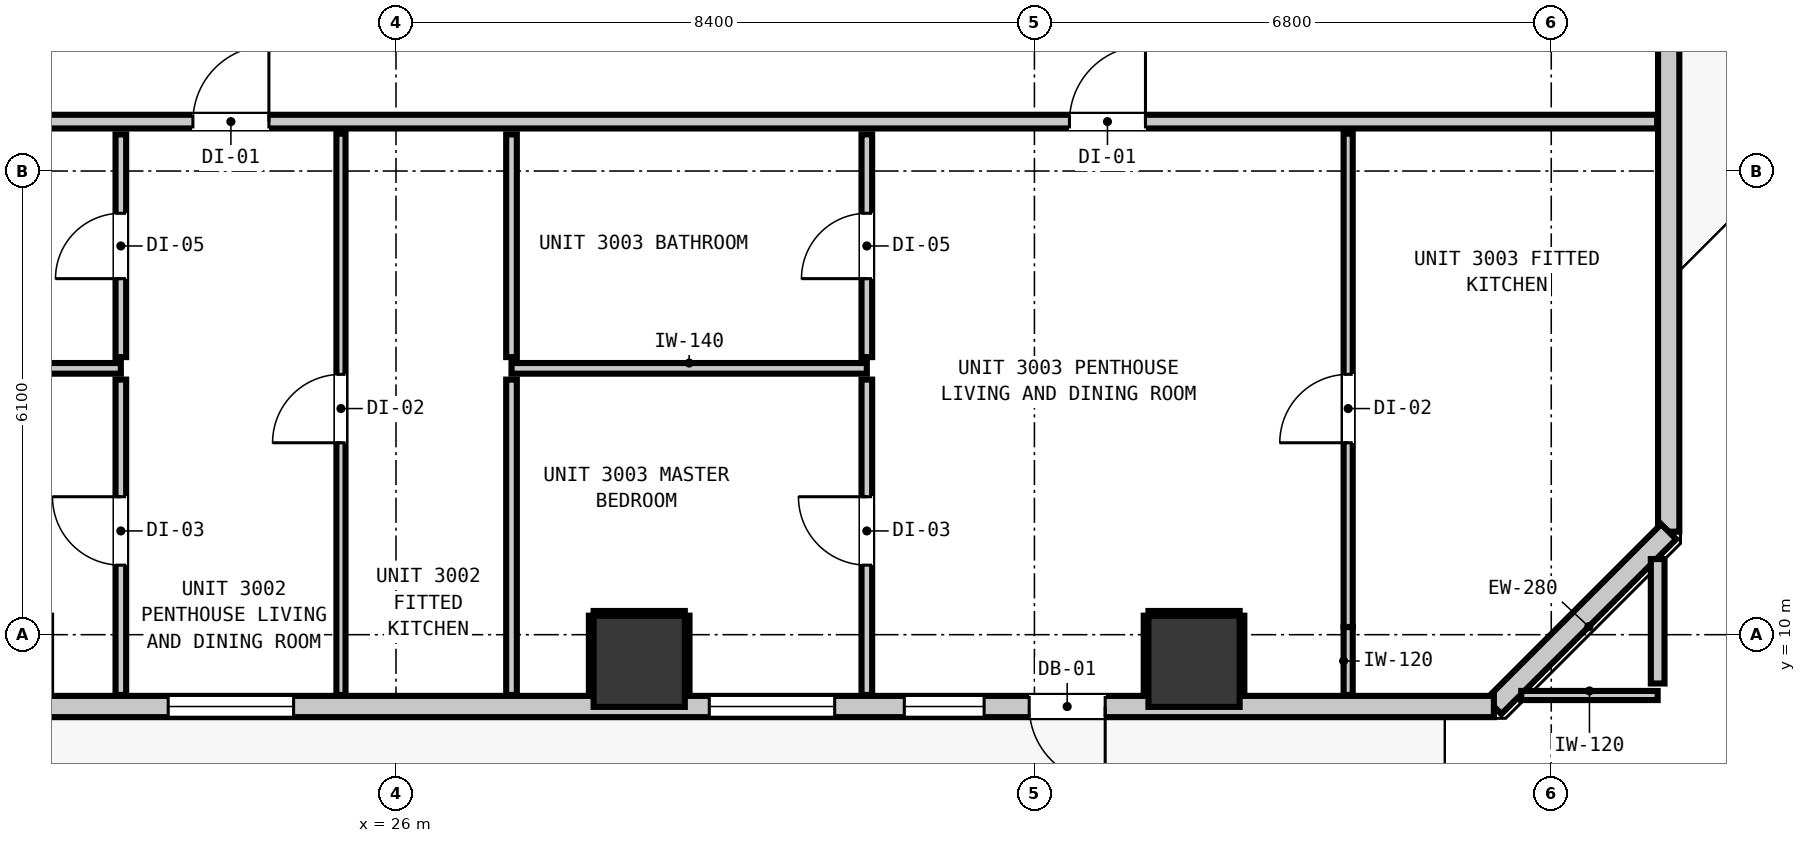
"""IFC4 building model, lengths in metres.
Left out: names, types, materials, properties, quantities, classifications, styles, units other than length and angle.
Written with IfcOpenShell. Run it as: python <this file> out.ifc"""

import sys

from ifc_helpers import new_model, si_unit, direction, frame, frame_2d, origin, origin_2d, place, context, subcontext, project, spatial, rectangle, extrude, element, fill, save


model = new_model("IFC4")
c1 = context("Model", 3, precision=1e-05, world=origin(), true_north=direction((0.0, 1.0)))
c2 = subcontext(c1, "Body", "Model", "MODEL_VIEW")
j1 = project(units=[si_unit("LENGTHUNIT", "METRE"), si_unit("PLANEANGLEUNIT", "RADIAN")], contexts=[c1])
p1 = place(None, origin())
s1 = spatial("IfcSite", under=j1, at=p1, CompositionType="ELEMENT")
p2 = place(p1, origin())
s2 = spatial("IfcBuilding", under=s1, at=p2, CompositionType="ELEMENT")
p3 = place(p2, frame((0.0, 0.0, 106.08)))
s3 = spatial("IfcBuildingStorey", under=s2, at=p3, CompositionType="ELEMENT", Elevation=106.08)
for number, where, z_axis, x_axis in (
    (1, (29.2, 9.65, -0.2), (0.0, 0.0, 1.0), (1.0, 0.0, 0.0)),
    (2, (36.5, 9.65, -0.2), (0.0, 0.0, 1.0), (1.0, 0.0, 0.0)),
):
    element("IfcColumn", number, at=place(p3, frame(where, z_axis=z_axis, x_axis=x_axis)), inside=s3, PredefinedType="COLUMN", context=c2, shape_type="SweptSolid", body=[
        extrude(rectangle(XDim=1.2, YDim=1.2, at=origin_2d()), origin(), (0.0, 0.0, 1.0), 3.52),
    ])
p4 = place(p3, frame((42.745, 43.645, 0.0), z_axis=(0.0, 0.0, 1.0), x_axis=(0.0, -1.0, 0.0)))
e3 = element("IfcWall", 3, at=p4, inside=s3, PredefinedType="STANDARD", context=c2, shape_type="SweptSolid", body=[
    extrude(rectangle(XDim=32.29, YDim=0.28, at=frame_2d((16.145, 0.0))), origin(), (0.0, 0.0, 1.0), 3.08),
])
p5 = place(p4, frame((6.821, 0.0, 0.0)))
e4 = element("IfcOpeningElement", 4, at=p5, cuts=e3, PredefinedType="OPENING", context=c2, shape_type="SweptSolid", body=[
    extrude(rectangle(XDim=1.1, YDim=2.15, at=frame_2d((0.55, 1.075))), frame((0.0, 0.15, 0.0), z_axis=(0.0, -1.0, 0.0), x_axis=(1.0, 0.0, 0.0)), (0.0, 0.0, 1.0), 0.3),
])
p6 = place(p4, frame((0.318, 0.0, 0.85)))
e5 = element("IfcOpeningElement", 5, at=p6, cuts=e3, PredefinedType="OPENING", context=c2, shape_type="SweptSolid", body=[
    extrude(rectangle(XDim=1.05, YDim=1.65, at=frame_2d((0.525, 0.825))), frame((0.0, 0.15, 0.0), z_axis=(0.0, -1.0, 0.0), x_axis=(1.0, 0.0, 0.0)), (0.0, 0.0, 1.0), 0.3),
])
p7 = place(p4, frame((16.895, 0.0, 0.85)))
e6 = element("IfcOpeningElement", 6, at=p7, cuts=e3, PredefinedType="OPENING", context=c2, shape_type="SweptSolid", body=[
    extrude(rectangle(XDim=1.65, YDim=1.75, at=frame_2d((0.825, 0.875))), frame((0.0, 0.15, 0.0), z_axis=(0.0, -1.0, 0.0), x_axis=(1.0, 0.0, 0.0)), (0.0, 0.0, 1.0), 0.3),
])
p8 = place(p4, frame((8.477, 0.0, 0.85)))
e7 = element("IfcOpeningElement", 7, at=p8, cuts=e3, PredefinedType="OPENING", context=c2, shape_type="SweptSolid", body=[
    extrude(rectangle(XDim=1.05, YDim=1.65, at=frame_2d((0.525, 0.825))), frame((0.0, 0.15, 0.0), z_axis=(0.0, -1.0, 0.0), x_axis=(1.0, 0.0, 0.0)), (0.0, 0.0, 1.0), 0.3),
])
p9 = place(p3, frame((42.745, 11.355, 0.0), z_axis=(0.0, 0.0, 1.0), x_axis=(-0.707106781187, -0.707106781187, 0.0)))
e8 = element("IfcWall", 8, at=p9, inside=s3, PredefinedType="STANDARD", context=c2, shape_type="SweptSolid", body=[
    extrude(rectangle(XDim=3.253, YDim=0.28, at=frame_2d((1.626, 0.0))), origin(), (0.0, 0.0, 1.0), 3.08),
])
p10 = place(p3, frame((40.445, 9.055, 0.0), z_axis=(0.0, 0.0, 1.0), x_axis=(-1.0, 0.0, 0.0)))
e9 = element("IfcWall", 9, at=p10, inside=s3, PredefinedType="STANDARD", context=c2, shape_type="SweptSolid", body=[
    extrude(rectangle(XDim=35.09, YDim=0.28, at=frame_2d((17.545, 0.0))), origin(), (0.0, 0.0, 1.0), 3.08),
])
p11 = place(p10, frame((5.114, 0.0, 0.0)))
e10 = element("IfcOpeningElement", 10, at=p11, cuts=e9, PredefinedType="OPENING", context=c2, shape_type="SweptSolid", body=[
    extrude(rectangle(XDim=1.0, YDim=2.15, at=frame_2d((0.5, 1.075))), frame((0.0, 0.15, 0.0), z_axis=(0.0, -1.0, 0.0), x_axis=(1.0, 0.0, 0.0)), (0.0, 0.0, 1.0), 0.3),
])
p12 = place(p10, frame((30.056, 0.0, 0.85)))
e11 = element("IfcOpeningElement", 11, at=p12, cuts=e9, PredefinedType="OPENING", context=c2, shape_type="SweptSolid", body=[
    extrude(rectangle(XDim=1.65, YDim=1.75, at=frame_2d((0.825, 0.875))), frame((0.0, 0.15, 0.0), z_axis=(0.0, -1.0, 0.0), x_axis=(1.0, 0.0, 0.0)), (0.0, 0.0, 1.0), 0.3),
])
p13 = place(p10, frame((33.593, 0.0, 0.85)))
e12 = element("IfcOpeningElement", 12, at=p13, cuts=e9, PredefinedType="OPENING", context=c2, shape_type="SweptSolid", body=[
    extrude(rectangle(XDim=1.05, YDim=1.65, at=frame_2d((0.525, 0.825))), frame((0.0, 0.15, 0.0), z_axis=(0.0, -1.0, 0.0), x_axis=(1.0, 0.0, 0.0)), (0.0, 0.0, 1.0), 0.3),
])
p14 = place(p10, frame((15.792, 0.0, 0.85)))
e13 = element("IfcOpeningElement", 13, at=p14, cuts=e9, PredefinedType="OPENING", context=c2, shape_type="SweptSolid", body=[
    extrude(rectangle(XDim=1.65, YDim=1.75, at=frame_2d((0.825, 0.875))), frame((0.0, 0.15, 0.0), z_axis=(0.0, -1.0, 0.0), x_axis=(1.0, 0.0, 0.0)), (0.0, 0.0, 1.0), 0.3),
])
p15 = place(p10, frame((21.243, 0.0, 0.85)))
e14 = element("IfcOpeningElement", 14, at=p15, cuts=e9, PredefinedType="OPENING", context=c2, shape_type="SweptSolid", body=[
    extrude(rectangle(XDim=1.65, YDim=1.75, at=frame_2d((0.825, 0.875))), frame((0.0, 0.15, 0.0), z_axis=(0.0, -1.0, 0.0), x_axis=(1.0, 0.0, 0.0)), (0.0, 0.0, 1.0), 0.3),
])
p16 = place(p10, frame((6.707, 0.0, 0.85)))
e15 = element("IfcOpeningElement", 15, at=p16, cuts=e9, PredefinedType="OPENING", context=c2, shape_type="SweptSolid", body=[
    extrude(rectangle(XDim=1.05, YDim=1.65, at=frame_2d((0.525, 0.825))), frame((0.0, 0.15, 0.0), z_axis=(0.0, -1.0, 0.0), x_axis=(1.0, 0.0, 0.0)), (0.0, 0.0, 1.0), 0.3),
])
p17 = place(p10, frame((8.673, 0.0, 0.85)))
e16 = element("IfcOpeningElement", 16, at=p17, cuts=e9, PredefinedType="OPENING", context=c2, shape_type="SweptSolid", body=[
    extrude(rectangle(XDim=1.65, YDim=1.75, at=frame_2d((0.825, 0.875))), frame((0.0, 0.15, 0.0), z_axis=(0.0, -1.0, 0.0), x_axis=(1.0, 0.0, 0.0)), (0.0, 0.0, 1.0), 0.3),
])
p18 = place(p3, frame((3.207, 16.75, 0.0), z_axis=(0.0, 0.0, 1.0), x_axis=(1.0, 0.0, 0.0)))
e17 = element("IfcWall", 17, at=p18, inside=s3, PredefinedType="PARTITIONING", context=c2, shape_type="SweptSolid", body=[
    extrude(rectangle(XDim=39.386, YDim=0.18, at=frame_2d((19.693, 0.0))), origin(), (0.0, 0.0, 1.0), 3.08),
])
p19 = place(p18, frame((5.858, 0.0, 0.0)))
e18 = element("IfcOpeningElement", 18, at=p19, cuts=e17, PredefinedType="OPENING", context=c2, shape_type="SweptSolid", body=[
    extrude(rectangle(XDim=1.0, YDim=2.15, at=frame_2d((0.5, 1.075))), frame((0.0, 0.1, 0.0), z_axis=(0.0, -1.0, 0.0), x_axis=(1.0, 0.0, 0.0)), (0.0, 0.0, 1.0), 0.2),
])
p20 = place(p18, frame((20.121, 0.0, 0.0)))
e19 = element("IfcOpeningElement", 19, at=p20, cuts=e17, PredefinedType="OPENING", context=c2, shape_type="SweptSolid", body=[
    extrude(rectangle(XDim=1.0, YDim=2.15, at=frame_2d((0.5, 1.075))), frame((0.0, 0.1, 0.0), z_axis=(0.0, -1.0, 0.0), x_axis=(1.0, 0.0, 0.0)), (0.0, 0.0, 1.0), 0.2),
])
p21 = place(p18, frame((31.654, 0.0, 0.0)))
e20 = element("IfcOpeningElement", 20, at=p21, cuts=e17, PredefinedType="OPENING", context=c2, shape_type="SweptSolid", body=[
    extrude(rectangle(XDim=1.0, YDim=2.15, at=frame_2d((0.5, 1.075))), frame((0.0, 0.1, 0.0), z_axis=(0.0, -1.0, 0.0), x_axis=(1.0, 0.0, 0.0)), (0.0, 0.0, 1.0), 0.2),
])
p22 = place(p3, frame((16.454, 13.504, 0.0), z_axis=(0.0, 0.0, 1.0), x_axis=(1.0, 0.0, 0.0)))
e21 = element("IfcWall", 21, at=p22, inside=s3, PredefinedType="PARTITIONING", context=c2, shape_type="SweptSolid", body=[
    extrude(rectangle(XDim=5.926, YDim=0.14, at=frame_2d((2.963, 0.0))), origin(), (0.0, 0.0, 1.0), 3.08),
])
p23 = place(p3, frame((27.52, 13.504, 0.0), z_axis=(0.0, 0.0, 1.0), x_axis=(1.0, 0.0, 0.0)))
e22 = element("IfcWall", 22, at=p23, inside=s3, PredefinedType="PARTITIONING", context=c2, shape_type="SweptSolid", body=[
    extrude(rectangle(XDim=4.675, YDim=0.14, at=frame_2d((2.337, 0.0))), origin(), (0.0, 0.0, 1.0), 3.08),
])
p24 = place(p3, frame((40.805, 9.2, 0.0), z_axis=(0.0, 0.0, 1.0), x_axis=(1.0, 0.0, 0.0)))
e23 = element("IfcWall", 23, at=p24, inside=s3, PredefinedType="PARTITIONING", context=c2, shape_type="SweptSolid", body=[
    extrude(rectangle(XDim=1.795, YDim=0.12, at=frame_2d((0.897, 0.0))), origin(), (0.0, 0.0, 1.0), 3.08),
])
p25 = place(p3, frame((42.6, 9.358, 0.0), z_axis=(0.0, 0.0, 1.0), x_axis=(0.0, 1.0, 0.0)))
e24 = element("IfcWall", 24, at=p25, inside=s3, PredefinedType="PARTITIONING", context=c2, shape_type="SweptSolid", body=[
    extrude(rectangle(XDim=1.637, YDim=0.18, at=frame_2d((0.819, 0.0))), origin(), (0.0, 0.0, 1.0), 3.08),
])
p26 = place(p3, frame((22.38, 9.207, 0.0), z_axis=(0.0, 0.0, 1.0), x_axis=(0.0, 1.0, 0.0)))
e25 = element("IfcWall", 25, at=p26, inside=s3, PredefinedType="PARTITIONING", context=c2, shape_type="SweptSolid", body=[
    extrude(rectangle(XDim=4.149, YDim=0.14, at=frame_2d((2.074, 0.0))), origin(), (0.0, 0.0, 1.0), 3.08),
])
p27 = place(p26, frame((1.708, 0.0, 0.0)))
e26 = element("IfcOpeningElement", 26, at=p27, cuts=e25, PredefinedType="OPENING", context=c2, shape_type="SweptSolid", body=[
    extrude(rectangle(XDim=0.9, YDim=2.1, at=frame_2d((0.45, 1.05))), frame((0.0, 0.08, 0.0), z_axis=(0.0, -1.0, 0.0), x_axis=(1.0, 0.0, 0.0)), (0.0, 0.0, 1.0), 0.16),
])
p28 = place(p3, frame((22.38, 13.652, 0.0), z_axis=(0.0, 0.0, 1.0), x_axis=(0.0, 1.0, 0.0)))
e27 = element("IfcWall", 27, at=p28, inside=s3, PredefinedType="PARTITIONING", context=c2, shape_type="SweptSolid", body=[
    extrude(rectangle(XDim=2.93, YDim=0.14, at=frame_2d((1.465, 0.0))), origin(), (0.0, 0.0, 1.0), 3.08),
])
p29 = place(p28, frame((1.032, 0.0, 0.0)))
e28 = element("IfcOpeningElement", 28, at=p29, cuts=e27, PredefinedType="OPENING", context=c2, shape_type="SweptSolid", body=[
    extrude(rectangle(XDim=0.86, YDim=2.02, at=frame_2d((0.43, 1.01))), frame((0.0, 0.08, 0.0), z_axis=(0.0, -1.0, 0.0), x_axis=(1.0, 0.0, 0.0)), (0.0, 0.0, 1.0), 0.16),
])
p30 = place(p3, frame((27.52, 9.207, 0.0), z_axis=(0.0, 0.0, 1.0), x_axis=(0.0, 1.0, 0.0)))
e29 = element("IfcWall", 29, at=p30, inside=s3, PredefinedType="PARTITIONING", context=c2, shape_type="SweptSolid", body=[
    extrude(rectangle(XDim=4.149, YDim=0.14, at=frame_2d((2.074, 0.0))), origin(), (0.0, 0.0, 1.0), 3.08),
])
p31 = place(p3, frame((27.52, 13.652, 0.0), z_axis=(0.0, 0.0, 1.0), x_axis=(0.0, 1.0, 0.0)))
e30 = element("IfcWall", 30, at=p31, inside=s3, PredefinedType="PARTITIONING", context=c2, shape_type="SweptSolid", body=[
    extrude(rectangle(XDim=2.93, YDim=0.14, at=frame_2d((1.465, 0.0))), origin(), (0.0, 0.0, 1.0), 3.08),
])
p32 = place(p3, frame((32.195, 9.207, 0.0), z_axis=(0.0, 0.0, 1.0), x_axis=(0.0, 1.0, 0.0)))
e31 = element("IfcWall", 31, at=p32, inside=s3, PredefinedType="PARTITIONING", context=c2, shape_type="SweptSolid", body=[
    extrude(rectangle(XDim=4.149, YDim=0.14, at=frame_2d((2.074, 0.0))), origin(), (0.0, 0.0, 1.0), 3.08),
])
p33 = place(p32, frame((1.708, 0.0, 0.0)))
e32 = element("IfcOpeningElement", 32, at=p33, cuts=e31, PredefinedType="OPENING", context=c2, shape_type="SweptSolid", body=[
    extrude(rectangle(XDim=0.9, YDim=2.1, at=frame_2d((0.45, 1.05))), frame((0.0, 0.08, 0.0), z_axis=(0.0, -1.0, 0.0), x_axis=(1.0, 0.0, 0.0)), (0.0, 0.0, 1.0), 0.16),
])
p34 = place(p3, frame((32.195, 13.652, 0.0), z_axis=(0.0, 0.0, 1.0), x_axis=(0.0, 1.0, 0.0)))
e33 = element("IfcWall", 33, at=p34, inside=s3, PredefinedType="PARTITIONING", context=c2, shape_type="SweptSolid", body=[
    extrude(rectangle(XDim=2.93, YDim=0.14, at=frame_2d((1.465, 0.0))), origin(), (0.0, 0.0, 1.0), 3.08),
])
p35 = place(p34, frame((1.032, 0.0, 0.0)))
e34 = element("IfcOpeningElement", 34, at=p35, cuts=e33, PredefinedType="OPENING", context=c2, shape_type="SweptSolid", body=[
    extrude(rectangle(XDim=0.86, YDim=2.02, at=frame_2d((0.43, 1.01))), frame((0.0, 0.08, 0.0), z_axis=(0.0, -1.0, 0.0), x_axis=(1.0, 0.0, 0.0)), (0.0, 0.0, 1.0), 0.16),
])
p36 = place(p3, frame((25.276, 9.207, 0.0), z_axis=(0.0, 0.0, 1.0), x_axis=(0.0, 1.0, 0.0)))
e35 = element("IfcWall", 35, at=p36, inside=s3, PredefinedType="PARTITIONING", context=c2, shape_type="SweptSolid", body=[
    extrude(rectangle(XDim=7.385, YDim=0.12, at=frame_2d((3.692, 0.0))), origin(), (0.0, 0.0, 1.0), 3.08),
])
p37 = place(p36, frame((3.318, 0.0, 0.0)))
e36 = element("IfcOpeningElement", 36, at=p37, cuts=e35, PredefinedType="OPENING", context=c2, shape_type="SweptSolid", body=[
    extrude(rectangle(XDim=0.9, YDim=2.1, at=frame_2d((0.45, 1.05))), frame((0.0, 0.07, 0.0), z_axis=(0.0, -1.0, 0.0), x_axis=(1.0, 0.0, 0.0)), (0.0, 0.0, 1.0), 0.14),
])
p38 = place(p3, frame((38.528, 9.207, 0.0), z_axis=(0.0, 0.0, 1.0), x_axis=(0.0, 1.0, 0.0)))
e37 = element("IfcWall", 37, at=p38, inside=s3, PredefinedType="PARTITIONING", context=c2, shape_type="SweptSolid", body=[
    extrude(rectangle(XDim=0.894, YDim=0.12, at=frame_2d((0.447, 0.0))), origin(), (0.0, 0.0, 1.0), 3.08),
])
p39 = place(p3, frame((38.528, 10.101, 0.0), z_axis=(0.0, 0.0, 1.0), x_axis=(0.0, 1.0, 0.0)))
e38 = element("IfcWall", 38, at=p39, inside=s3, PredefinedType="PARTITIONING", context=c2, shape_type="SweptSolid", body=[
    extrude(rectangle(XDim=6.491, YDim=0.12, at=frame_2d((3.246, 0.0))), origin(), (0.0, 0.0, 1.0), 2.565),
])
p40 = place(p39, frame((2.424, 0.0, 0.0)))
e39 = element("IfcOpeningElement", 39, at=p40, cuts=e38, PredefinedType="OPENING", context=c2, shape_type="SweptSolid", body=[
    extrude(rectangle(XDim=0.9, YDim=2.1, at=frame_2d((0.45, 1.05))), frame((0.0, 0.07, 0.0), z_axis=(0.0, -1.0, 0.0), x_axis=(1.0, 0.0, 0.0)), (0.0, 0.0, 1.0), 0.14),
])
p41 = place(p3, frame((28.6, 10.282, 0.0), z_axis=(0.0, 0.0, 1.0), x_axis=(1.0, 0.0, 0.0)))
e40 = element("IfcWall", 40, at=p41, inside=s3, PredefinedType="PARTITIONING", context=c2, shape_type="SweptSolid", body=[
    extrude(rectangle(XDim=1.2, YDim=0.06, at=frame_2d((0.6, 0.0))), origin(), (0.0, 0.0, 1.0), 1.45),
])
for number, where, z_axis, x_axis in (
    (41, (28.568, 9.21, 0.0), (0.0, 0.0, 1.0), (0.0, 1.0, 0.0)),
    (42, (29.832, 9.21, 0.0), (0.0, 0.0, 1.0), (0.0, 1.0, 0.0)),
):
    element("IfcWall", number, at=place(p3, frame(where, z_axis=z_axis, x_axis=x_axis)), inside=s3, PredefinedType="PARTITIONING", context=c2, shape_type="SweptSolid", body=[
        extrude(rectangle(XDim=1.04, YDim=0.06, at=frame_2d((0.52, 0.0))), origin(), (0.0, 0.0, 1.0), 1.45),
    ])
p42 = place(p3, frame((35.9, 10.282, 0.0), z_axis=(0.0, 0.0, 1.0), x_axis=(1.0, 0.0, 0.0)))
e43 = element("IfcWall", 43, at=p42, inside=s3, PredefinedType="PARTITIONING", context=c2, shape_type="SweptSolid", body=[
    extrude(rectangle(XDim=1.2, YDim=0.06, at=frame_2d((0.6, 0.0))), origin(), (0.0, 0.0, 1.0), 1.45),
])
for number, where, z_axis, x_axis in (
    (44, (35.868, 9.21, 0.0), (0.0, 0.0, 1.0), (0.0, 1.0, 0.0)),
    (45, (37.132, 9.21, 0.0), (0.0, 0.0, 1.0), (0.0, 1.0, 0.0)),
):
    element("IfcWall", number, at=place(p3, frame(where, z_axis=z_axis, x_axis=x_axis)), inside=s3, PredefinedType="PARTITIONING", context=c2, shape_type="SweptSolid", body=[
        extrude(rectangle(XDim=1.04, YDim=0.06, at=frame_2d((0.52, 0.0))), origin(), (0.0, 0.0, 1.0), 1.45),
    ])
p43 = place(p11, origin())
e46 = element("IfcDoor", 46, at=p43, inside=s3, OperationType="SINGLE_SWING_LEFT", PredefinedType="DOOR", context=c2, shape_type="SweptSolid", body=[
    extrude(rectangle(XDim=1.0, YDim=2.15, at=frame_2d((0.5, 1.075))), frame((0.0, 0.025, 0.0), z_axis=(0.0, -1.0, 0.0), x_axis=(1.0, 0.0, 0.0)), (0.0, 0.0, 1.0), 0.05),
])
fill(e10, e46)
p44 = place(p14, origin())
e47 = element("IfcWindow", 47, at=p44, inside=s3, PartitioningType="SINGLE_PANEL", PredefinedType="WINDOW", context=c2, shape_type="SweptSolid", body=[
    extrude(rectangle(XDim=1.65, YDim=1.75, at=frame_2d((0.825, 0.875))), frame((0.0, 0.03, 0.0), z_axis=(0.0, -1.0, 0.0), x_axis=(1.0, 0.0, 0.0)), (0.0, 0.0, 1.0), 0.06),
])
fill(e13, e47)
p45 = place(p16, origin())
e48 = element("IfcWindow", 48, at=p45, inside=s3, PartitioningType="SINGLE_PANEL", PredefinedType="WINDOW", context=c2, shape_type="SweptSolid", body=[
    extrude(rectangle(XDim=1.05, YDim=1.65, at=frame_2d((0.525, 0.825))), frame((0.0, 0.03, 0.0), z_axis=(0.0, -1.0, 0.0), x_axis=(1.0, 0.0, 0.0)), (0.0, 0.0, 1.0), 0.06),
])
fill(e15, e48)
p46 = place(p17, origin())
e49 = element("IfcWindow", 49, at=p46, inside=s3, PartitioningType="SINGLE_PANEL", PredefinedType="WINDOW", context=c2, shape_type="SweptSolid", body=[
    extrude(rectangle(XDim=1.65, YDim=1.75, at=frame_2d((0.825, 0.875))), frame((0.0, 0.03, 0.0), z_axis=(0.0, -1.0, 0.0), x_axis=(1.0, 0.0, 0.0)), (0.0, 0.0, 1.0), 0.06),
])
fill(e16, e49)
p47 = place(p20, origin())
e50 = element("IfcDoor", 50, at=p47, inside=s3, OperationType="SINGLE_SWING_RIGHT", PredefinedType="DOOR", context=c2, shape_type="SweptSolid", body=[
    extrude(rectangle(XDim=1.0, YDim=2.15, at=frame_2d((0.5, 1.075))), frame((0.0, 0.025, 0.0), z_axis=(0.0, -1.0, 0.0), x_axis=(1.0, 0.0, 0.0)), (0.0, 0.0, 1.0), 0.05),
])
fill(e19, e50)
p48 = place(p29, origin())
e51 = element("IfcDoor", 51, at=p48, inside=s3, OperationType="SINGLE_SWING_LEFT", PredefinedType="DOOR", context=c2, shape_type="SweptSolid", body=[
    extrude(rectangle(XDim=0.86, YDim=2.02, at=frame_2d((0.43, 1.01))), frame((0.0, 0.025, 0.0), z_axis=(0.0, -1.0, 0.0), x_axis=(1.0, 0.0, 0.0)), (0.0, 0.0, 1.0), 0.05),
])
fill(e28, e51)
p49 = place(p27, origin())
e52 = element("IfcDoor", 52, at=p49, inside=s3, OperationType="SINGLE_SWING_RIGHT", PredefinedType="DOOR", context=c2, shape_type="SweptSolid", body=[
    extrude(rectangle(XDim=0.9, YDim=2.1, at=frame_2d((0.45, 1.05))), frame((0.0, 0.025, 0.0), z_axis=(0.0, -1.0, 0.0), x_axis=(1.0, 0.0, 0.0)), (0.0, 0.0, 1.0), 0.05),
])
fill(e26, e52)
p50 = place(p37, origin())
e53 = element("IfcDoor", 53, at=p50, inside=s3, OperationType="SINGLE_SWING_LEFT", PredefinedType="DOOR", context=c2, shape_type="SweptSolid", body=[
    extrude(rectangle(XDim=0.9, YDim=2.1, at=frame_2d((0.45, 1.05))), frame((0.0, 0.025, 0.0), z_axis=(0.0, -1.0, 0.0), x_axis=(1.0, 0.0, 0.0)), (0.0, 0.0, 1.0), 0.05),
])
fill(e36, e53)
p51 = place(p21, origin())
e54 = element("IfcDoor", 54, at=p51, inside=s3, OperationType="SINGLE_SWING_RIGHT", PredefinedType="DOOR", context=c2, shape_type="SweptSolid", body=[
    extrude(rectangle(XDim=1.0, YDim=2.15, at=frame_2d((0.5, 1.075))), frame((0.0, 0.025, 0.0), z_axis=(0.0, -1.0, 0.0), x_axis=(1.0, 0.0, 0.0)), (0.0, 0.0, 1.0), 0.05),
])
fill(e20, e54)
p52 = place(p35, origin())
e55 = element("IfcDoor", 55, at=p52, inside=s3, OperationType="SINGLE_SWING_LEFT", PredefinedType="DOOR", context=c2, shape_type="SweptSolid", body=[
    extrude(rectangle(XDim=0.86, YDim=2.02, at=frame_2d((0.43, 1.01))), frame((0.0, 0.025, 0.0), z_axis=(0.0, -1.0, 0.0), x_axis=(1.0, 0.0, 0.0)), (0.0, 0.0, 1.0), 0.05),
])
fill(e34, e55)
p53 = place(p33, origin())
e56 = element("IfcDoor", 56, at=p53, inside=s3, OperationType="SINGLE_SWING_RIGHT", PredefinedType="DOOR", context=c2, shape_type="SweptSolid", body=[
    extrude(rectangle(XDim=0.9, YDim=2.1, at=frame_2d((0.45, 1.05))), frame((0.0, 0.025, 0.0), z_axis=(0.0, -1.0, 0.0), x_axis=(1.0, 0.0, 0.0)), (0.0, 0.0, 1.0), 0.05),
])
fill(e32, e56)
p54 = place(p40, origin())
e57 = element("IfcDoor", 57, at=p54, inside=s3, OperationType="SINGLE_SWING_LEFT", PredefinedType="DOOR", context=c2, shape_type="SweptSolid", body=[
    extrude(rectangle(XDim=0.9, YDim=2.1, at=frame_2d((0.45, 1.05))), frame((0.0, 0.025, 0.0), z_axis=(0.0, -1.0, 0.0), x_axis=(1.0, 0.0, 0.0)), (0.0, 0.0, 1.0), 0.05),
])
fill(e39, e57)
save(model, sys.argv[1])
